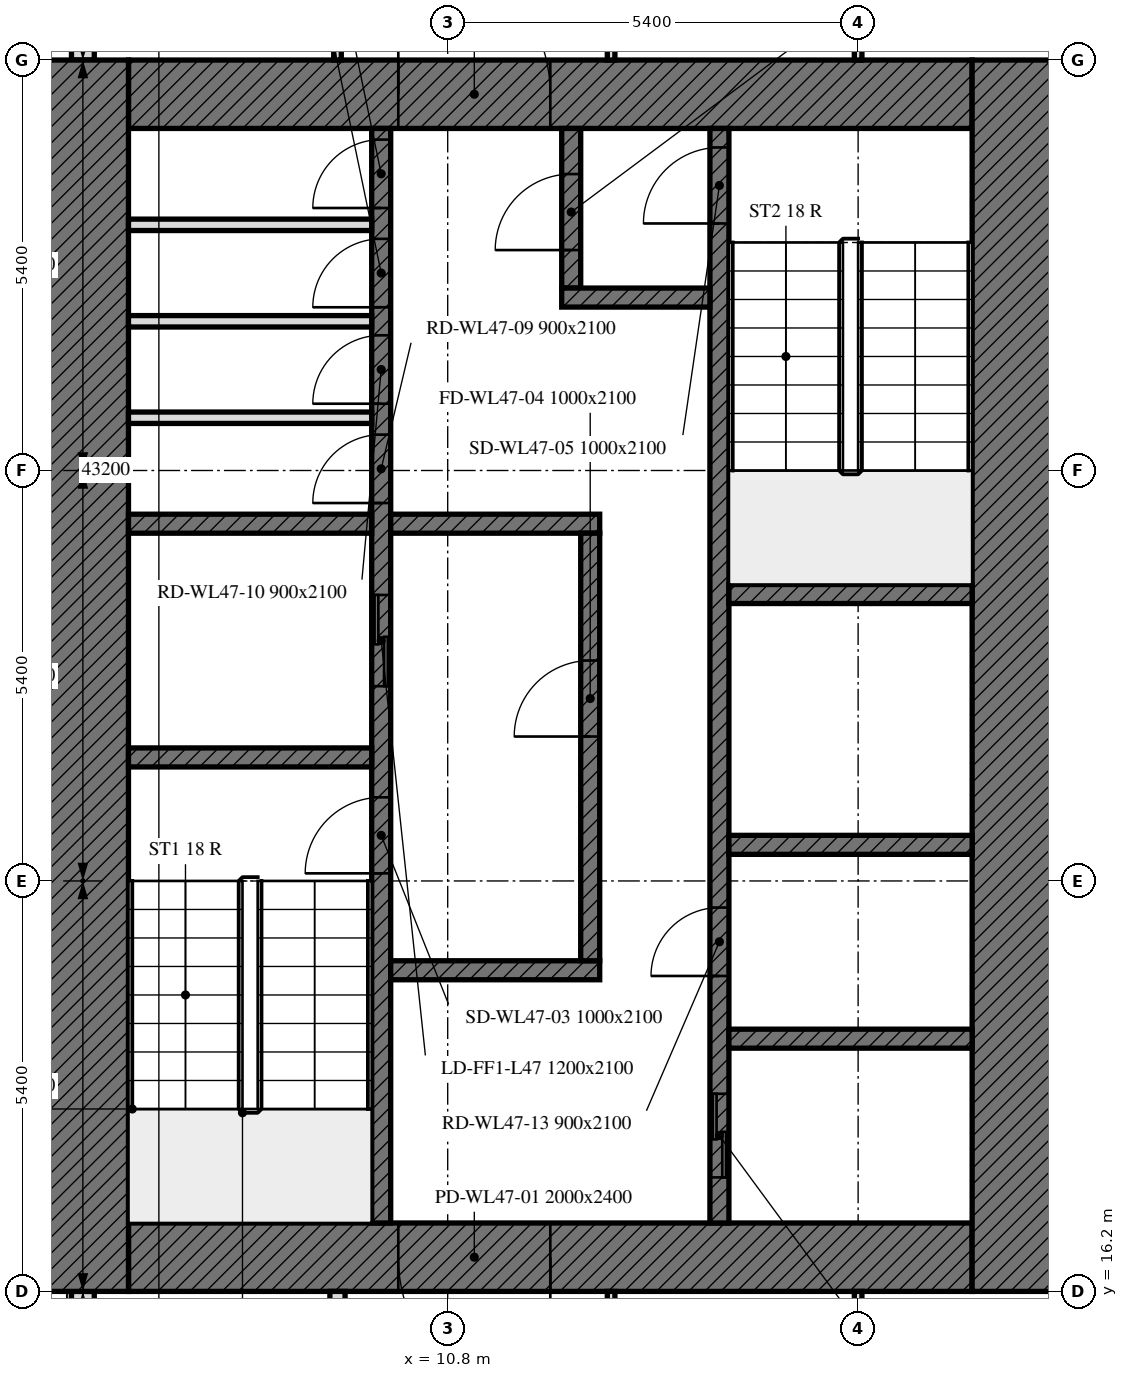
"""IFC4 building model, lengths in metres.
Left out: names, types, materials, properties, quantities, classifications, styles, units other than length and angle.
Written with IfcOpenShell. Run it as: python <this file> out.ifc"""

import sys

from ifc_helpers import new_model, si_unit, direction, frame, frame_2d, origin, place, context, subcontext, project, spatial, rectangle, extrude, element, fill, save


model = new_model("IFC4")
c1 = context("Model", 3, precision=1e-05, world=origin(), true_north=direction((0.0, 1.0)))
c2 = subcontext(c1, "Body", "Model", "MODEL_VIEW")
j1 = project(units=[si_unit("LENGTHUNIT", "METRE"), si_unit("PLANEANGLEUNIT", "RADIAN")], contexts=[c1])
p1 = place(None, origin())
s1 = spatial("IfcSite", under=j1, at=p1, CompositionType="ELEMENT")
p2 = place(p1, origin())
s2 = spatial("IfcBuilding", under=s1, at=p2, CompositionType="ELEMENT")
p3 = place(p2, frame((0.0, 0.0, 193.9)))
s3 = spatial("IfcBuildingStorey", under=s2, at=p3, CompositionType="ELEMENT", Elevation=193.9)
p4 = place(p3, frame((6.0, 43.014, 0.0), z_axis=(0.0, 0.0, 1.0), x_axis=(0.0, -1.0, 0.0)))
e1 = element("IfcWall", 1, at=p4, inside=s3, PredefinedType="SOLIDWALL", context=c2, shape_type="SweptSolid", body=[
    extrude(rectangle(XDim=10.614, YDim=0.3, at=frame_2d((5.307, 0.0))), origin(), (0.0, 0.0, 1.0), 3.0),
])
p5 = place(p4, frame((1.789, 0.0, 0.9)))
e2 = element("IfcOpeningElement", 2, at=p5, cuts=e1, PredefinedType="OPENING", context=c2, shape_type="SweptSolid", body=[
    extrude(rectangle(XDim=0.65, YDim=1.7, at=frame_2d((0.325, 0.85))), frame((0.0, 0.16, 0.0), z_axis=(0.0, -1.0, 0.0), x_axis=(1.0, 0.0, 0.0)), (0.0, 0.0, 1.0), 0.32),
])
p6 = place(p4, frame((2.589, 0.0, 0.9)))
e3 = element("IfcOpeningElement", 3, at=p6, cuts=e1, PredefinedType="OPENING", context=c2, shape_type="SweptSolid", body=[
    extrude(rectangle(XDim=0.65, YDim=1.7, at=frame_2d((0.325, 0.85))), frame((0.0, 0.16, 0.0), z_axis=(0.0, -1.0, 0.0), x_axis=(1.0, 0.0, 0.0)), (0.0, 0.0, 1.0), 0.32),
])
p7 = place(p4, frame((6.564, 0.0, 0.9)))
e4 = element("IfcOpeningElement", 4, at=p7, cuts=e1, PredefinedType="OPENING", context=c2, shape_type="SweptSolid", body=[
    extrude(rectangle(XDim=1.1, YDim=1.7, at=frame_2d((0.55, 0.85))), frame((0.0, 0.16, 0.0), z_axis=(0.0, -1.0, 0.0), x_axis=(1.0, 0.0, 0.0)), (0.0, 0.0, 1.0), 0.32),
])
p8 = place(p4, frame((8.164, 0.0, 0.9)))
e5 = element("IfcOpeningElement", 5, at=p8, cuts=e1, PredefinedType="OPENING", context=c2, shape_type="SweptSolid", body=[
    extrude(rectangle(XDim=1.1, YDim=1.7, at=frame_2d((0.55, 0.85))), frame((0.0, 0.16, 0.0), z_axis=(0.0, -1.0, 0.0), x_axis=(1.0, 0.0, 0.0)), (0.0, 0.0, 1.0), 0.32),
])
p9 = place(p3, frame((6.0, 16.2, 0.0), z_axis=(0.0, 0.0, 1.0), x_axis=(0.0, -1.0, 0.0)))
e6 = element("IfcWall", 6, at=p9, inside=s3, PredefinedType="SOLIDWALL", context=c2, shape_type="SweptSolid", body=[
    extrude(rectangle(XDim=5.214, YDim=0.3, at=frame_2d((2.607, 0.0))), origin(), (0.0, 0.0, 1.0), 3.0),
])
p10 = place(p9, frame((1.35, 0.0, 0.9)))
e7 = element("IfcOpeningElement", 7, at=p10, cuts=e6, PredefinedType="OPENING", context=c2, shape_type="SweptSolid", body=[
    extrude(rectangle(XDim=1.1, YDim=1.7, at=frame_2d((0.55, 0.85))), frame((0.0, 0.16, 0.0), z_axis=(0.0, -1.0, 0.0), x_axis=(1.0, 0.0, 0.0)), (0.0, 0.0, 1.0), 0.32),
])
p11 = place(p9, frame((2.95, 0.0, 0.9)))
e8 = element("IfcOpeningElement", 8, at=p11, cuts=e6, PredefinedType="OPENING", context=c2, shape_type="SweptSolid", body=[
    extrude(rectangle(XDim=1.1, YDim=1.7, at=frame_2d((0.55, 0.85))), frame((0.0, 0.16, 0.0), z_axis=(0.0, -1.0, 0.0), x_axis=(1.0, 0.0, 0.0)), (0.0, 0.0, 1.0), 0.32),
])
p12 = place(p3, frame((17.7, 16.65, 0.0), z_axis=(0.0, 0.0, 1.0), x_axis=(-1.0, 0.0, 0.0)))
e9 = element("IfcWall", 9, at=p12, inside=s3, PredefinedType="SOLIDWALL", context=c2, shape_type="SweptSolid", body=[
    extrude(rectangle(XDim=11.1, YDim=0.9, at=frame_2d((5.55, 0.0))), origin(), (0.0, 0.0, 1.0), 3.0),
])
p13 = place(p12, frame((5.55, 0.0, 0.0)))
e10 = element("IfcOpeningElement", 10, at=p13, cuts=e9, PredefinedType="OPENING", context=c2, shape_type="SweptSolid", body=[
    extrude(rectangle(XDim=2.0, YDim=2.4, at=frame_2d((1.0, 1.2))), frame((0.0, 0.45, 0.0), z_axis=(0.0, -1.0, 0.0), x_axis=(1.0, 0.0, 0.0)), (0.0, 0.0, 1.0), 0.9),
])
p14 = place(p3, frame((6.6, 31.95, 0.0), z_axis=(0.0, 0.0, 1.0), x_axis=(1.0, 0.0, 0.0)))
e11 = element("IfcWall", 11, at=p14, inside=s3, PredefinedType="SOLIDWALL", context=c2, shape_type="SweptSolid", body=[
    extrude(rectangle(XDim=11.1, YDim=0.9, at=frame_2d((5.55, 0.0))), origin(), (0.0, 0.0, 1.0), 3.0),
])
p15 = place(p14, frame((3.55, 0.0, 0.0)))
e12 = element("IfcOpeningElement", 12, at=p15, cuts=e11, PredefinedType="OPENING", context=c2, shape_type="SweptSolid", body=[
    extrude(rectangle(XDim=2.0, YDim=2.4, at=frame_2d((1.0, 1.2))), frame((0.0, 0.45, 0.0), z_axis=(0.0, -1.0, 0.0), x_axis=(1.0, 0.0, 0.0)), (0.0, 0.0, 1.0), 0.9),
])
for number, where, z_axis, x_axis in (
    (13, (6.0, 16.2, 0.0), (0.0, 0.0, 1.0), (0.0, 1.0, 0.0)),
    (14, (18.3, 32.4, 0.0), (0.0, 0.0, 1.0), (0.0, -1.0, 0.0)),
):
    element("IfcWall", number, at=place(p3, frame(where, z_axis=z_axis, x_axis=x_axis)), inside=s3, PredefinedType="SOLIDWALL", context=c2, shape_type="SweptSolid", body=[
        extrude(rectangle(XDim=16.2, YDim=1.2, at=frame_2d((8.1, 0.0))), origin(), (0.0, 0.0, 1.0), 3.0),
    ])
p16 = place(p3, frame((9.925, 17.1, 0.0), z_axis=(0.0, 0.0, 1.0), x_axis=(0.0, 1.0, 0.0)))
e15 = element("IfcWall", 15, at=p16, inside=s3, PredefinedType="SOLIDWALL", context=c2, shape_type="SweptSolid", body=[
    extrude(rectangle(XDim=14.4, YDim=0.25, at=frame_2d((7.2, 0.0))), origin(), (0.0, 0.0, 1.0), 3.0),
])
p17 = place(p16, frame((4.6, 0.0, 0.0)))
e16 = element("IfcOpeningElement", 16, at=p17, cuts=e15, PredefinedType="OPENING", context=c2, shape_type="SweptSolid", body=[
    extrude(rectangle(XDim=1.0, YDim=2.1, at=frame_2d((0.5, 1.05))), frame((0.0, 0.125, 0.0), z_axis=(0.0, -1.0, 0.0), x_axis=(1.0, 0.0, 0.0)), (0.0, 0.0, 1.0), 0.25),
])
p18 = place(p16, frame((7.062, 0.0, 0.0)))
e17 = element("IfcOpeningElement", 17, at=p18, cuts=e15, PredefinedType="OPENING", context=c2, shape_type="SweptSolid", body=[
    extrude(rectangle(XDim=1.2, YDim=2.1, at=frame_2d((0.6, 1.05))), frame((0.0, 0.125, 0.0), z_axis=(0.0, -1.0, 0.0), x_axis=(1.0, 0.0, 0.0)), (0.0, 0.0, 1.0), 0.25),
])
p19 = place(p16, frame((9.472, 0.0, 0.0)))
e18 = element("IfcOpeningElement", 18, at=p19, cuts=e15, PredefinedType="OPENING", context=c2, shape_type="SweptSolid", body=[
    extrude(rectangle(XDim=0.9, YDim=2.1, at=frame_2d((0.45, 1.05))), frame((0.0, 0.125, 0.0), z_axis=(0.0, -1.0, 0.0), x_axis=(1.0, 0.0, 0.0)), (0.0, 0.0, 1.0), 0.25),
])
p20 = place(p16, frame((10.779, 0.0, 0.0)))
e19 = element("IfcOpeningElement", 19, at=p20, cuts=e15, PredefinedType="OPENING", context=c2, shape_type="SweptSolid", body=[
    extrude(rectangle(XDim=0.9, YDim=2.1, at=frame_2d((0.45, 1.05))), frame((0.0, 0.125, 0.0), z_axis=(0.0, -1.0, 0.0), x_axis=(1.0, 0.0, 0.0)), (0.0, 0.0, 1.0), 0.25),
])
p21 = place(p16, frame((12.048, 0.0, 0.0)))
e20 = element("IfcOpeningElement", 20, at=p21, cuts=e15, PredefinedType="OPENING", context=c2, shape_type="SweptSolid", body=[
    extrude(rectangle(XDim=0.9, YDim=2.1, at=frame_2d((0.45, 1.05))), frame((0.0, 0.125, 0.0), z_axis=(0.0, -1.0, 0.0), x_axis=(1.0, 0.0, 0.0)), (0.0, 0.0, 1.0), 0.25),
])
p22 = place(p16, frame((13.354, 0.0, 0.0)))
e21 = element("IfcOpeningElement", 21, at=p22, cuts=e15, PredefinedType="OPENING", context=c2, shape_type="SweptSolid", body=[
    extrude(rectangle(XDim=0.9, YDim=2.1, at=frame_2d((0.45, 1.05))), frame((0.0, 0.125, 0.0), z_axis=(0.0, -1.0, 0.0), x_axis=(1.0, 0.0, 0.0)), (0.0, 0.0, 1.0), 0.25),
])
p23 = place(p3, frame((14.375, 17.1, 0.0), z_axis=(0.0, 0.0, 1.0), x_axis=(0.0, 1.0, 0.0)))
e22 = element("IfcWall", 22, at=p23, inside=s3, PredefinedType="SOLIDWALL", context=c2, shape_type="SweptSolid", body=[
    extrude(rectangle(XDim=14.4, YDim=0.25, at=frame_2d((7.2, 0.0))), origin(), (0.0, 0.0, 1.0), 3.0),
])
p24 = place(p23, frame((13.15, 0.0, 0.0)))
e23 = element("IfcOpeningElement", 23, at=p24, cuts=e22, PredefinedType="OPENING", context=c2, shape_type="SweptSolid", body=[
    extrude(rectangle(XDim=1.0, YDim=2.1, at=frame_2d((0.5, 1.05))), frame((0.0, 0.125, 0.0), z_axis=(0.0, -1.0, 0.0), x_axis=(1.0, 0.0, 0.0)), (0.0, 0.0, 1.0), 0.25),
])
p25 = place(p23, frame((0.6, 0.0, 0.0)))
e24 = element("IfcOpeningElement", 24, at=p25, cuts=e22, PredefinedType="OPENING", context=c2, shape_type="SweptSolid", body=[
    extrude(rectangle(XDim=1.1, YDim=2.1, at=frame_2d((0.55, 1.05))), frame((0.0, 0.125, 0.0), z_axis=(0.0, -1.0, 0.0), x_axis=(1.0, 0.0, 0.0)), (0.0, 0.0, 1.0), 0.25),
])
p26 = place(p23, frame((3.25, 0.0, 0.0)))
e25 = element("IfcOpeningElement", 25, at=p26, cuts=e22, PredefinedType="OPENING", context=c2, shape_type="SweptSolid", body=[
    extrude(rectangle(XDim=0.9, YDim=2.1, at=frame_2d((0.45, 1.05))), frame((0.0, 0.125, 0.0), z_axis=(0.0, -1.0, 0.0), x_axis=(1.0, 0.0, 0.0)), (0.0, 0.0, 1.0), 0.25),
])
for number, where, z_axis, x_axis in (
    (26, (6.6, 23.225, 0.0), (0.0, 0.0, 1.0), (1.0, 0.0, 0.0)),
    (27, (14.5, 25.375, 0.0), (0.0, 0.0, 1.0), (1.0, 0.0, 0.0)),
    (28, (14.5, 22.075, 0.0), (0.0, 0.0, 1.0), (1.0, 0.0, 0.0)),
    (29, (6.6, 26.3, 0.0), (0.0, 0.0, 1.0), (1.0, 0.0, 0.0)),
):
    element("IfcWall", number, at=place(p3, frame(where, z_axis=z_axis, x_axis=x_axis)), inside=s3, PredefinedType="SOLIDWALL", context=c2, shape_type="SweptSolid", body=[
        extrude(rectangle(XDim=3.2, YDim=0.25, at=frame_2d((1.6, 0.0))), origin(), (0.0, 0.0, 1.0), 3.0),
    ])
for number, where, z_axis, x_axis in (
    (30, (10.05, 26.3, 0.0), (0.0, 0.0, 1.0), (1.0, 0.0, 0.0)),
    (31, (10.05, 20.425, 0.0), (0.0, 0.0, 1.0), (1.0, 0.0, 0.0)),
):
    element("IfcWall", number, at=place(p3, frame(where, z_axis=z_axis, x_axis=x_axis)), inside=s3, PredefinedType="SOLIDWALL", context=c2, shape_type="SweptSolid", body=[
        extrude(rectangle(XDim=2.75, YDim=0.25, at=frame_2d((1.375, 0.0))), origin(), (0.0, 0.0, 1.0), 3.0),
    ])
p27 = place(p3, frame((12.425, 29.4, 0.0), z_axis=(0.0, 0.0, 1.0), x_axis=(0.0, 1.0, 0.0)))
e32 = element("IfcWall", 32, at=p27, inside=s3, PredefinedType="SOLIDWALL", context=c2, shape_type="SweptSolid", body=[
    extrude(rectangle(XDim=2.1, YDim=0.25, at=frame_2d((1.05, 0.0))), origin(), (0.0, 0.0, 1.0), 3.0),
])
p28 = place(p27, frame((0.5, 0.0, 0.0)))
e33 = element("IfcOpeningElement", 33, at=p28, cuts=e32, PredefinedType="OPENING", context=c2, shape_type="SweptSolid", body=[
    extrude(rectangle(XDim=1.0, YDim=2.1, at=frame_2d((0.5, 1.05))), frame((0.0, 0.125, 0.0), z_axis=(0.0, -1.0, 0.0), x_axis=(1.0, 0.0, 0.0)), (0.0, 0.0, 1.0), 0.25),
])
p29 = place(p3, frame((12.3, 29.275, 0.0), z_axis=(0.0, 0.0, 1.0), x_axis=(1.0, 0.0, 0.0)))
e34 = element("IfcWall", 34, at=p29, inside=s3, PredefinedType="SOLIDWALL", context=c2, shape_type="SweptSolid", body=[
    extrude(rectangle(XDim=1.95, YDim=0.25, at=frame_2d((0.975, 0.0))), origin(), (0.0, 0.0, 1.0), 3.0),
])
p30 = place(p3, frame((12.675, 20.55, 0.0), z_axis=(0.0, 0.0, 1.0), x_axis=(0.0, 1.0, 0.0)))
e35 = element("IfcWall", 35, at=p30, inside=s3, PredefinedType="SOLIDWALL", context=c2, shape_type="SweptSolid", body=[
    extrude(rectangle(XDim=5.625, YDim=0.25, at=frame_2d((2.812, 0.0))), origin(), (0.0, 0.0, 1.0), 3.0),
])
p31 = place(p30, frame((2.95, 0.0, 0.0)))
e36 = element("IfcOpeningElement", 36, at=p31, cuts=e35, PredefinedType="OPENING", context=c2, shape_type="SweptSolid", body=[
    extrude(rectangle(XDim=1.0, YDim=2.1, at=frame_2d((0.5, 1.05))), frame((0.0, 0.125, 0.0), z_axis=(0.0, -1.0, 0.0), x_axis=(1.0, 0.0, 0.0)), (0.0, 0.0, 1.0), 0.25),
])
p32 = place(p3, frame((14.5, 19.525, 0.0), z_axis=(0.0, 0.0, 1.0), x_axis=(1.0, 0.0, 0.0)))
e37 = element("IfcWall", 37, at=p32, inside=s3, PredefinedType="SOLIDWALL", context=c2, shape_type="SweptSolid", body=[
    extrude(rectangle(XDim=3.2, YDim=0.25, at=frame_2d((1.6, 0.0))), origin(), (0.0, 0.0, 1.0), 3.0),
])
for number, where, z_axis, x_axis in (
    (38, (6.6, 27.694, 0.0), (0.0, 0.0, 1.0), (1.0, 0.0, 0.0)),
    (39, (6.6, 28.963, 0.0), (0.0, 0.0, 1.0), (1.0, 0.0, 0.0)),
    (40, (6.6, 30.232, 0.0), (0.0, 0.0, 1.0), (1.0, 0.0, 0.0)),
):
    element("IfcWall", number, at=place(p3, frame(where, z_axis=z_axis, x_axis=x_axis)), inside=s3, PredefinedType="PARTITIONING", context=c2, shape_type="SweptSolid", body=[
        extrude(rectangle(XDim=3.2, YDim=0.15, at=frame_2d((1.6, 0.0))), origin(), (0.0, 0.0, 1.0), 3.0),
    ])
p33 = place(p3, frame((16.2, 37.38, 0.0), z_axis=(0.0, 0.0, 1.0), x_axis=(0.0, -1.0, 0.0)))
e41 = element("IfcWall", 41, at=p33, inside=s3, PredefinedType="PARTITIONING", context=c2, shape_type="SweptSolid", body=[
    extrude(rectangle(XDim=4.98, YDim=0.1, at=frame_2d((2.49, 0.0))), origin(), (0.0, 0.0, 1.0), 2.4),
])
for number, where, z_axis, x_axis in (
    (42, (9.35, 39.525, 0.0), (0.0, 0.0, 1.0), (0.0, -1.0, 0.0)),
    (43, (12.95, 32.4, 0.0), (0.0, 0.0, 1.0), (0.0, 1.0, 0.0)),
):
    element("IfcWall", number, at=place(p3, frame(where, z_axis=z_axis, x_axis=x_axis)), inside=s3, PredefinedType="PARTITIONING", context=c2, shape_type="SweptSolid", body=[
        extrude(rectangle(XDim=7.125, YDim=0.1, at=frame_2d((3.562, 0.0))), origin(), (0.0, 0.0, 1.0), 3.0),
    ])
p34 = place(p3, frame((16.2, 16.2, 0.0), z_axis=(0.0, 0.0, 1.0), x_axis=(0.0, -1.0, 0.0)))
e44 = element("IfcWall", 44, at=p34, inside=s3, PredefinedType="PARTITIONING", context=c2, shape_type="SweptSolid", body=[
    extrude(rectangle(XDim=2.625, YDim=0.1, at=frame_2d((1.312, 0.0))), origin(), (0.0, 0.0, 1.0), 3.0),
])
p35 = place(p3, frame((9.35, 16.2, 0.0), z_axis=(0.0, 0.0, 1.0), x_axis=(0.0, -1.0, 0.0)))
e45 = element("IfcWall", 45, at=p35, inside=s3, PredefinedType="PARTITIONING", context=c2, shape_type="SweptSolid", body=[
    extrude(rectangle(XDim=2.8, YDim=0.2, at=frame_2d((1.4, 0.0))), origin(), (0.0, 0.0, 1.0), 3.0),
])
p36 = place(p3, frame((12.95, 13.575, 0.0), z_axis=(0.0, 0.0, 1.0), x_axis=(0.0, 1.0, 0.0)))
e46 = element("IfcWall", 46, at=p36, inside=s3, PredefinedType="PARTITIONING", context=c2, shape_type="SweptSolid", body=[
    extrude(rectangle(XDim=2.625, YDim=0.1, at=frame_2d((1.312, 0.0))), origin(), (0.0, 0.0, 1.0), 3.0),
])
p37 = place(p13, origin())
e47 = element("IfcDoor", 47, at=p37, inside=s3, OperationType="DOUBLE_DOOR_SINGLE_SWING", PredefinedType="DOOR", context=c2, shape_type="SweptSolid", body=[
    extrude(rectangle(XDim=2.0, YDim=2.4, at=frame_2d((1.0, 1.2))), frame((0.0, 0.025, 0.0), z_axis=(0.0, -1.0, 0.0), x_axis=(1.0, 0.0, 0.0)), (0.0, 0.0, 1.0), 0.05),
])
fill(e10, e47)
p38 = place(p15, origin())
e48 = element("IfcDoor", 48, at=p38, inside=s3, OperationType="DOUBLE_DOOR_SINGLE_SWING", PredefinedType="DOOR", context=c2, shape_type="SweptSolid", body=[
    extrude(rectangle(XDim=2.0, YDim=2.4, at=frame_2d((1.0, 1.2))), frame((0.0, 0.025, 0.0), z_axis=(0.0, -1.0, 0.0), x_axis=(1.0, 0.0, 0.0)), (0.0, 0.0, 1.0), 0.05),
])
fill(e12, e48)
p39 = place(p17, origin())
e49 = element("IfcDoor", 49, at=p39, inside=s3, OperationType="SINGLE_SWING_LEFT", PredefinedType="DOOR", context=c2, shape_type="SweptSolid", body=[
    extrude(rectangle(XDim=1.0, YDim=2.1, at=frame_2d((0.5, 1.05))), frame((0.0, 0.025, 0.0), z_axis=(0.0, -1.0, 0.0), x_axis=(1.0, 0.0, 0.0)), (0.0, 0.0, 1.0), 0.05),
])
fill(e16, e49)
p40 = place(p31, origin())
e50 = element("IfcDoor", 50, at=p40, inside=s3, OperationType="SINGLE_SWING_LEFT", PredefinedType="DOOR", context=c2, shape_type="SweptSolid", body=[
    extrude(rectangle(XDim=1.0, YDim=2.1, at=frame_2d((0.5, 1.05))), frame((0.0, 0.025, 0.0), z_axis=(0.0, -1.0, 0.0), x_axis=(1.0, 0.0, 0.0)), (0.0, 0.0, 1.0), 0.05),
])
fill(e36, e50)
p41 = place(p24, origin())
e51 = element("IfcDoor", 51, at=p41, inside=s3, OperationType="SINGLE_SWING_LEFT", PredefinedType="DOOR", context=c2, shape_type="SweptSolid", body=[
    extrude(rectangle(XDim=1.0, YDim=2.1, at=frame_2d((0.5, 1.05))), frame((0.0, 0.025, 0.0), z_axis=(0.0, -1.0, 0.0), x_axis=(1.0, 0.0, 0.0)), (0.0, 0.0, 1.0), 0.05),
])
fill(e23, e51)
p42 = place(p28, origin())
e52 = element("IfcDoor", 52, at=p42, inside=s3, OperationType="SINGLE_SWING_LEFT", PredefinedType="DOOR", context=c2, shape_type="SweptSolid", body=[
    extrude(rectangle(XDim=1.0, YDim=2.1, at=frame_2d((0.5, 1.05))), frame((0.0, 0.025, 0.0), z_axis=(0.0, -1.0, 0.0), x_axis=(1.0, 0.0, 0.0)), (0.0, 0.0, 1.0), 0.05),
])
fill(e33, e52)
p43 = place(p18, origin())
e53 = element("IfcDoor", 53, at=p43, inside=s3, OperationType="DOUBLE_DOOR_SLIDING", PredefinedType="DOOR", context=c2, shape_type="SweptSolid", body=[
    extrude(rectangle(XDim=1.2, YDim=2.1, at=frame_2d((0.6, 1.05))), frame((0.0, 0.025, 0.0), z_axis=(0.0, -1.0, 0.0), x_axis=(1.0, 0.0, 0.0)), (0.0, 0.0, 1.0), 0.05),
])
fill(e17, e53)
p44 = place(p25, origin())
e54 = element("IfcDoor", 54, at=p44, inside=s3, OperationType="DOUBLE_DOOR_SLIDING", PredefinedType="DOOR", context=c2, shape_type="SweptSolid", body=[
    extrude(rectangle(XDim=1.1, YDim=2.1, at=frame_2d((0.55, 1.05))), frame((0.0, 0.025, 0.0), z_axis=(0.0, -1.0, 0.0), x_axis=(1.0, 0.0, 0.0)), (0.0, 0.0, 1.0), 0.05),
])
fill(e24, e54)
p45 = place(p19, origin())
e55 = element("IfcDoor", 55, at=p45, inside=s3, OperationType="SINGLE_SWING_LEFT", PredefinedType="DOOR", context=c2, shape_type="SweptSolid", body=[
    extrude(rectangle(XDim=0.9, YDim=2.1, at=frame_2d((0.45, 1.05))), frame((0.0, 0.025, 0.0), z_axis=(0.0, -1.0, 0.0), x_axis=(1.0, 0.0, 0.0)), (0.0, 0.0, 1.0), 0.05),
])
fill(e18, e55)
p46 = place(p20, origin())
e56 = element("IfcDoor", 56, at=p46, inside=s3, OperationType="SINGLE_SWING_LEFT", PredefinedType="DOOR", context=c2, shape_type="SweptSolid", body=[
    extrude(rectangle(XDim=0.9, YDim=2.1, at=frame_2d((0.45, 1.05))), frame((0.0, 0.025, 0.0), z_axis=(0.0, -1.0, 0.0), x_axis=(1.0, 0.0, 0.0)), (0.0, 0.0, 1.0), 0.05),
])
fill(e19, e56)
p47 = place(p21, origin())
e57 = element("IfcDoor", 57, at=p47, inside=s3, OperationType="SINGLE_SWING_LEFT", PredefinedType="DOOR", context=c2, shape_type="SweptSolid", body=[
    extrude(rectangle(XDim=0.9, YDim=2.1, at=frame_2d((0.45, 1.05))), frame((0.0, 0.025, 0.0), z_axis=(0.0, -1.0, 0.0), x_axis=(1.0, 0.0, 0.0)), (0.0, 0.0, 1.0), 0.05),
])
fill(e20, e57)
p48 = place(p22, origin())
e58 = element("IfcDoor", 58, at=p48, inside=s3, OperationType="SINGLE_SWING_LEFT", PredefinedType="DOOR", context=c2, shape_type="SweptSolid", body=[
    extrude(rectangle(XDim=0.9, YDim=2.1, at=frame_2d((0.45, 1.05))), frame((0.0, 0.025, 0.0), z_axis=(0.0, -1.0, 0.0), x_axis=(1.0, 0.0, 0.0)), (0.0, 0.0, 1.0), 0.05),
])
fill(e21, e58)
p49 = place(p26, origin())
e59 = element("IfcDoor", 59, at=p49, inside=s3, OperationType="SINGLE_SWING_LEFT", PredefinedType="DOOR", context=c2, shape_type="SweptSolid", body=[
    extrude(rectangle(XDim=0.9, YDim=2.1, at=frame_2d((0.45, 1.05))), frame((0.0, 0.025, 0.0), z_axis=(0.0, -1.0, 0.0), x_axis=(1.0, 0.0, 0.0)), (0.0, 0.0, 1.0), 0.05),
])
fill(e25, e59)
save(model, sys.argv[1])
